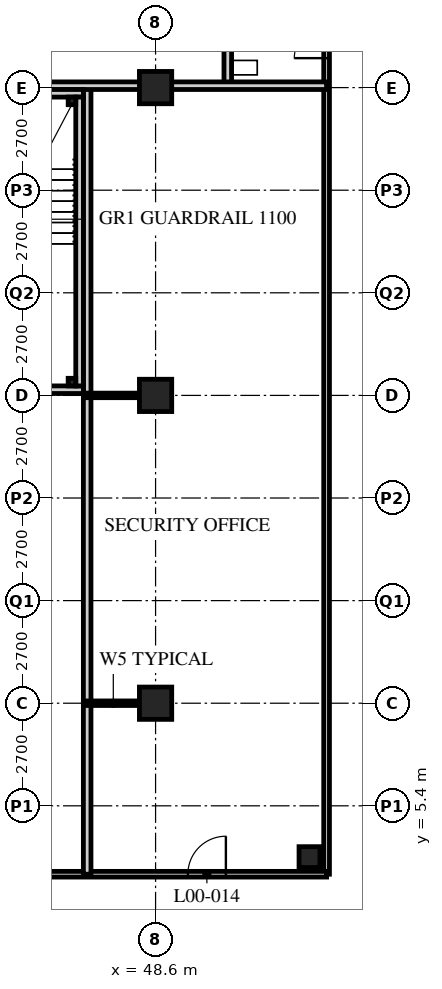
"""IFC4 building model, lengths in metres.
Left out: names, types, materials, properties, quantities, classifications, styles, units other than length and angle.
Written with IfcOpenShell. Run it as: python <this file> out.ifc"""

import sys

from ifc_helpers import new_model, si_unit, direction, frame, frame_2d, origin, origin_2d, place, context, subcontext, project, spatial, rectangle, hollow_rectangle, extrude, element, fill, save


model = new_model("IFC4")
c1 = context("Model", 3, precision=1e-05, world=origin(), true_north=direction((0.0, 1.0)))
c2 = subcontext(c1, "Body", "Model", "MODEL_VIEW")
j1 = project(units=[si_unit("LENGTHUNIT", "METRE"), si_unit("PLANEANGLEUNIT", "RADIAN")], contexts=[c1])
p1 = place(None, origin())
s1 = spatial("IfcSite", under=j1, at=p1, CompositionType="ELEMENT")
p2 = place(p1, origin())
s2 = spatial("IfcBuilding", under=s1, at=p2, CompositionType="ELEMENT")
p3 = place(p2, origin())
s3 = spatial("IfcBuildingStorey", under=s2, at=p3, CompositionType="ELEMENT", Elevation=0.0)
for number, where, z_axis, x_axis in (
    (1, (48.6, 8.1, 0.0), (0.0, 0.0, 1.0), (1.0, 0.0, 0.0)),
    (2, (48.6, 16.2, 0.0), (0.0, 0.0, 1.0), (1.0, 0.0, 0.0)),
    (3, (48.6, 24.3, 0.0), (0.0, 0.0, 1.0), (1.0, 0.0, 0.0)),
):
    element("IfcColumn", number, at=place(p3, frame(where, z_axis=z_axis, x_axis=x_axis)), inside=s3, PredefinedType="COLUMN", context=c2, shape_type="SweptSolid", body=[
        extrude(hollow_rectangle(XDim=0.85, YDim=0.85, WallThickness=0.085, at=origin_2d()), origin(), (0.0, 0.0, 1.0), 6.0),
    ])
p4 = place(p3, frame((52.65, 4.05, 0.0), z_axis=(0.0, 0.0, 1.0), x_axis=(1.0, 0.0, 0.0)))
e4 = element("IfcColumn", 4, at=p4, inside=s3, PredefinedType="COLUMN", context=c2, shape_type="SweptSolid", body=[
    extrude(hollow_rectangle(XDim=0.55, YDim=0.55, WallThickness=0.05, at=origin_2d()), origin(), (0.0, 0.0, 1.0), 6.0),
])
p5 = place(p3, frame((53.1, 3.6, 0.0), z_axis=(0.0, 0.0, 1.0), x_axis=(0.0, 1.0, 0.0)))
e5 = element("IfcWall", 5, at=p5, inside=s3, PredefinedType="PARTITIONING", context=c2, shape_type="SweptSolid", body=[
    extrude(rectangle(XDim=36.9, YDim=0.15, at=frame_2d((18.45, 0.0))), origin(), (0.0, 0.0, 1.0), 5.75),
])
p6 = place(p5, frame((21.475, 0.0, 0.0)))
e6 = element("IfcOpeningElement", 6, at=p6, cuts=e5, PredefinedType="OPENING", context=c2, shape_type="SweptSolid", body=[
    extrude(rectangle(XDim=0.85, YDim=2.1, at=frame_2d((0.425, 1.05))), frame((0.0, 0.085, 0.0), z_axis=(0.0, -1.0, 0.0), x_axis=(1.0, 0.0, 0.0)), (0.0, 0.0, 1.0), 0.17),
])
p7 = place(p5, frame((24.025, 0.0, 0.0)))
e7 = element("IfcOpeningElement", 7, at=p7, cuts=e5, PredefinedType="OPENING", context=c2, shape_type="SweptSolid", body=[
    extrude(rectangle(XDim=1.0, YDim=2.1, at=frame_2d((0.5, 1.05))), frame((0.0, 0.085, 0.0), z_axis=(0.0, -1.0, 0.0), x_axis=(1.0, 0.0, 0.0)), (0.0, 0.0, 1.0), 0.17),
])
p8 = place(p5, frame((26.875, 0.0, 0.0)))
e8 = element("IfcOpeningElement", 8, at=p8, cuts=e5, PredefinedType="OPENING", context=c2, shape_type="SweptSolid", body=[
    extrude(rectangle(XDim=1.0, YDim=2.1, at=frame_2d((0.5, 1.05))), frame((0.0, 0.085, 0.0), z_axis=(0.0, -1.0, 0.0), x_axis=(1.0, 0.0, 0.0)), (0.0, 0.0, 1.0), 0.17),
])
p9 = place(p5, frame((32.35, 0.0, 0.0)))
e9 = element("IfcOpeningElement", 9, at=p9, cuts=e5, PredefinedType="OPENING", context=c2, shape_type="SweptSolid", body=[
    extrude(rectangle(XDim=1.0, YDim=2.1, at=frame_2d((0.5, 1.05))), frame((0.0, 0.085, 0.0), z_axis=(0.0, -1.0, 0.0), x_axis=(1.0, 0.0, 0.0)), (0.0, 0.0, 1.0), 0.17),
])
p10 = place(p3, frame((29.56, 3.6, 0.0), z_axis=(0.0, 0.0, 1.0), x_axis=(1.0, 0.0, 0.0)))
e10 = element("IfcWall", 10, at=p10, inside=s3, PredefinedType="PARTITIONING", context=c2, shape_type="SweptSolid", body=[
    extrude(rectangle(XDim=23.54, YDim=0.15, at=frame_2d((11.77, 0.0))), origin(), (0.0, 0.0, 1.0), 5.75),
])
p11 = place(p10, frame((5.815, 0.0, 0.0)))
e11 = element("IfcOpeningElement", 11, at=p11, cuts=e10, PredefinedType="OPENING", context=c2, shape_type="SweptSolid", body=[
    extrude(rectangle(XDim=1.0, YDim=2.1, at=frame_2d((0.5, 1.05))), frame((0.0, 0.085, 0.0), z_axis=(0.0, -1.0, 0.0), x_axis=(1.0, 0.0, 0.0)), (0.0, 0.0, 1.0), 0.17),
])
p12 = place(p10, frame((19.89, 0.0, 0.0)))
e12 = element("IfcOpeningElement", 12, at=p12, cuts=e10, PredefinedType="OPENING", context=c2, shape_type="SweptSolid", body=[
    extrude(rectangle(XDim=1.0, YDim=2.1, at=frame_2d((0.5, 1.05))), frame((0.0, 0.085, 0.0), z_axis=(0.0, -1.0, 0.0), x_axis=(1.0, 0.0, 0.0)), (0.0, 0.0, 1.0), 0.17),
])
p13 = place(p3, frame((50.5, 24.3, 0.0), z_axis=(0.0, 0.0, 1.0), x_axis=(0.0, 1.0, 0.0)))
e13 = element("IfcWall", 13, at=p13, inside=s3, PredefinedType="SOLIDWALL", context=c2, shape_type="SweptSolid", body=[
    extrude(rectangle(XDim=2.4, YDim=0.2, at=frame_2d((1.2, 0.0))), origin(), (0.0, 0.0, 1.0), 5.75),
])
p14 = place(p3, frame((46.8, 3.6, 0.0), z_axis=(0.0, 0.0, 1.0), x_axis=(0.0, 1.0, 0.0)))
e14 = element("IfcWall", 14, at=p14, inside=s3, PredefinedType="SOLIDWALL", context=c2, shape_type="SweptSolid", body=[
    extrude(rectangle(XDim=20.7, YDim=0.2, at=frame_2d((10.35, 0.0))), origin(), (0.0, 0.0, 1.0), 5.75),
])
p15 = place(p3, frame((40.5, 24.35, 0.0), z_axis=(0.0, 0.0, 1.0), x_axis=(1.0, 0.0, 0.0)))
e15 = element("IfcWall", 15, at=p15, inside=s3, PredefinedType="SOLIDWALL", context=c2, shape_type="SweptSolid", body=[
    extrude(rectangle(XDim=12.6, YDim=0.2, at=frame_2d((6.3, 0.0))), origin(), (0.0, 0.0, 1.0), 5.138),
])
for number, where, z_axis, x_axis in (
    (16, (46.8, 8.1, 0.0), (0.0, 0.0, 1.0), (1.0, 0.0, 0.0)),
    (17, (46.8, 16.2, 0.0), (0.0, 0.0, 1.0), (1.0, 0.0, 0.0)),
):
    element("IfcWall", number, at=place(p3, frame(where, z_axis=z_axis, x_axis=x_axis)), inside=s3, PredefinedType="PARTITIONING", context=c2, shape_type="SweptSolid", body=[
        extrude(rectangle(XDim=1.375, YDim=0.12, at=frame_2d((0.688, 0.0))), origin(), (0.0, 0.0, 1.0), 5.138),
    ])
p16 = place(p3, frame((42.3, 16.35, 0.0), z_axis=(0.0, 0.0, 1.0), x_axis=(1.0, 0.0, 0.0)))
e18 = element("IfcWall", 18, at=p16, inside=s3, PredefinedType="SOLIDWALL", context=c2, shape_type="SweptSolid", body=[
    extrude(rectangle(XDim=4.4, YDim=0.2, at=frame_2d((2.2, 0.0))), origin(), (0.0, 0.0, 1.0), 5.138),
])
p17 = place(p16, frame((1.6, 0.0, 0.0)))
e19 = element("IfcOpeningElement", 19, at=p17, cuts=e18, PredefinedType="OPENING", context=c2, shape_type="SweptSolid", body=[
    extrude(rectangle(XDim=1.2, YDim=2.1, at=frame_2d((0.6, 1.05))), frame((0.0, 0.11, 0.0), z_axis=(0.0, -1.0, 0.0), x_axis=(1.0, 0.0, 0.0)), (0.0, 0.0, 1.0), 0.22),
])
p18 = place(p3, frame((42.3, 24.15, 0.0), z_axis=(0.0, 0.0, 1.0), x_axis=(1.0, 0.0, 0.0)))
e20 = element("IfcWall", 20, at=p18, inside=s3, PredefinedType="SOLIDWALL", context=c2, shape_type="SweptSolid", body=[
    extrude(rectangle(XDim=4.4, YDim=0.2, at=frame_2d((2.2, 0.0))), origin(), (0.0, 0.0, 1.0), 5.138),
])
p19 = place(p3, frame((46.6, 16.45, 0.0), z_axis=(0.0, 0.0, 1.0), x_axis=(0.0, 1.0, 0.0)))
e21 = element("IfcWall", 21, at=p19, inside=s3, PredefinedType="SOLIDWALL", context=c2, shape_type="SweptSolid", body=[
    extrude(rectangle(XDim=7.6, YDim=0.2, at=frame_2d((3.8, 0.0))), origin(), (0.0, 0.0, 1.0), 5.75),
])
for number, where, z_axis, x_axis in (
    (22, (46.4, 23.95, 0.0), (0.0, 0.0, 1.0), (1.0, 0.0, 0.0)),
    (23, (46.4, 16.55, 0.0), (0.0, 0.0, 1.0), (1.0, 0.0, 0.0)),
):
    element("IfcColumn", number, at=place(p3, frame(where, z_axis=z_axis, x_axis=x_axis)), inside=s3, PredefinedType="COLUMN", context=c2, shape_type="SweptSolid", body=[
        extrude(hollow_rectangle(XDim=0.2, YDim=0.2, WallThickness=0.012, at=origin_2d()), origin(), (0.0, 0.0, 1.0), 6.0),
    ])
p20 = place(p6, origin())
e24 = element("IfcDoor", 24, at=p20, inside=s3, OperationType="SINGLE_SWING_LEFT", PredefinedType="DOOR", context=c2, shape_type="SweptSolid", body=[
    extrude(rectangle(XDim=0.85, YDim=2.1, at=frame_2d((0.425, 1.05))), frame((0.0, 0.025, 0.0), z_axis=(0.0, -1.0, 0.0), x_axis=(1.0, 0.0, 0.0)), (0.0, 0.0, 1.0), 0.05),
])
fill(e6, e24)
p21 = place(p12, origin())
e25 = element("IfcDoor", 25, at=p21, inside=s3, OperationType="SINGLE_SWING_RIGHT", PredefinedType="DOOR", context=c2, shape_type="SweptSolid", body=[
    extrude(rectangle(XDim=1.0, YDim=2.1, at=frame_2d((0.5, 1.05))), frame((0.0, 0.025, 0.0), z_axis=(0.0, -1.0, 0.0), x_axis=(1.0, 0.0, 0.0)), (0.0, 0.0, 1.0), 0.05),
])
fill(e12, e25)
save(model, sys.argv[1])
